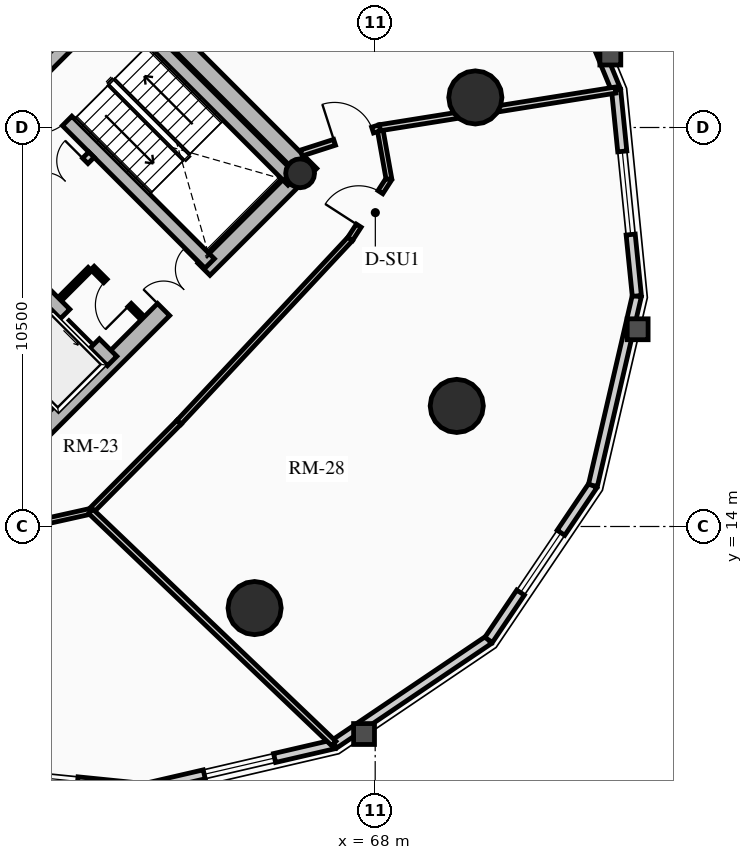
"""IFC4 building model, lengths in metres.
Left out: names, types, materials, properties, quantities, classifications, styles, units other than length and angle.
Written with IfcOpenShell. Run it as: python <this file> out.ifc"""

import sys

from ifc_helpers import new_model, si_unit, direction, frame, frame_2d, origin, origin_2d, place, context, subcontext, project, spatial, rectangle, circle, hollow_circle, extrude, source, transform, mapped, element, fill, save


model = new_model("IFC4")
c1 = context("Model", 3, precision=1e-05, world=origin(), true_north=direction((0.0, 1.0)))
c2 = subcontext(c1, "Body", "Model", "MODEL_VIEW")
j1 = project(units=[si_unit("LENGTHUNIT", "METRE"), si_unit("PLANEANGLEUNIT", "RADIAN")], contexts=[c1])
p1 = place(None, origin())
s1 = spatial("IfcSite", under=j1, at=p1, CompositionType="ELEMENT")
p2 = place(p1, origin())
s2 = spatial("IfcBuilding", under=s1, at=p2, CompositionType="ELEMENT")
p3 = place(p2, frame((0.0, 0.0, 136.6)))
s3 = spatial("IfcBuildingStorey", under=s2, at=p3, CompositionType="ELEMENT", Elevation=136.6)
p4 = place(p3, frame((66.303, 23.263, 0.0), z_axis=(0.0, 0.0, 1.0), x_axis=(-0.707106781187, 0.707106781187, 0.0)))
e1 = element("IfcWall", 1, at=p4, inside=s3, PredefinedType="SHEAR", context=c2, shape_type="SweptSolid", body=[
    extrude(rectangle(XDim=14.2, YDim=0.45, at=frame_2d((7.1, 0.0))), origin(), (0.0, 0.0, 1.0), 3.72),
])
p5 = place(p3, frame((58.578, 15.856, 0.0), z_axis=(0.0, 0.0, 1.0), x_axis=(0.707106781187, 0.707106781187, 0.0)))
e2 = element("IfcWall", 2, at=p5, inside=s3, PredefinedType="SHEAR", context=c2, shape_type="SweptSolid", body=[
    extrude(rectangle(XDim=10.7, YDim=0.45, at=frame_2d((5.35, 0.0))), origin(), (0.0, 0.0, 1.0), 3.72),
])
m1 = source(origin(), c2, "Body", "SweptSolid", [
    extrude(rectangle(XDim=1.5, YDim=2.02, at=frame_2d((0.75, 1.01))), frame((0.0, 0.235, 0.0), z_axis=(0.0, -1.0, 0.0), x_axis=(1.0, 0.0, 0.0)), (0.0, 0.0, 1.0), 0.47),
])
p6 = place(p5, frame((5.45, 0.0, 0.0)))
e3 = element("IfcOpeningElement", 3, at=p6, cuts=e2, PredefinedType="OPENING", context=c2, shape_type="MappedRepresentation", body=[
    mapped(m1, transform((0.0, 0.0, 0.0), x_axis=(1.0, 0.0, 0.0), y_axis=(0.0, 1.0, 0.0), z_axis=(0.0, 0.0, 1.0), scale=1.0)),
])
p7 = place(p3, frame((61.078, 18.355, 0.0), z_axis=(0.0, 0.0, 1.0), x_axis=(-0.707106781187, 0.707106781187, 0.0)))
e4 = element("IfcWall", 4, at=p7, inside=s3, PredefinedType="SHEAR", context=c2, shape_type="SweptSolid", body=[
    extrude(rectangle(XDim=13.75, YDim=0.35, at=frame_2d((6.875, 0.0))), origin(), (0.0, 0.0, 1.0), 3.72),
])
m2 = source(origin(), c2, "Body", "SweptSolid", [
    extrude(rectangle(XDim=1.1, YDim=2.015, at=frame_2d((0.55, 1.007))), frame((0.0, 0.185, 0.0), z_axis=(0.0, -1.0, 0.0), x_axis=(1.0, 0.0, 0.0)), (0.0, 0.0, 1.0), 0.37),
])
p8 = place(p7, frame((4.875, 0.0, 0.0)))
e5 = element("IfcOpeningElement", 5, at=p8, cuts=e4, PredefinedType="OPENING", context=c2, shape_type="MappedRepresentation", body=[
    mapped(m2, transform((0.0, 0.0, 0.0), x_axis=(1.0, 0.0, 0.0), y_axis=(0.0, 1.0, 0.0), z_axis=(0.0, 0.0, 1.0), scale=1.0)),
])
p9 = place(p7, frame((0.65, 0.0, 0.0)))
e6 = element("IfcOpeningElement", 6, at=p9, cuts=e4, PredefinedType="OPENING", context=c2, shape_type="MappedRepresentation", body=[
    mapped(m2, transform((0.0, 0.0, 0.0), x_axis=(1.0, 0.0, 0.0), y_axis=(0.0, 1.0, 0.0), z_axis=(0.0, 0.0, 1.0), scale=1.0)),
])
p10 = place(p7, frame((2.65, 0.0, 0.0)))
e7 = element("IfcOpeningElement", 7, at=p10, cuts=e4, PredefinedType="OPENING", context=c2, shape_type="MappedRepresentation", body=[
    mapped(m2, transform((0.0, 0.0, 0.0), x_axis=(1.0, 0.0, 0.0), y_axis=(0.0, 1.0, 0.0), z_axis=(0.0, 0.0, 1.0), scale=1.0)),
])
m3 = source(origin(), c2, "Body", "SweptSolid", [
    extrude(rectangle(XDim=1.15, YDim=2.02, at=frame_2d((0.575, 1.01))), frame((0.0, 0.185, 0.0), z_axis=(0.0, -1.0, 0.0), x_axis=(1.0, 0.0, 0.0)), (0.0, 0.0, 1.0), 0.37),
])
p11 = place(p7, frame((7.295, 0.0, 0.0)))
e8 = element("IfcOpeningElement", 8, at=p11, cuts=e4, PredefinedType="OPENING", context=c2, shape_type="MappedRepresentation", body=[
    mapped(m3, transform((0.0, 0.0, 0.0), x_axis=(1.0, 0.0, 0.0), y_axis=(0.0, 1.0, 0.0), z_axis=(0.0, 0.0, 1.0), scale=1.0)),
])
p12 = place(p3, frame((63.645, 20.922, 0.0), z_axis=(0.0, 0.0, 1.0), x_axis=(-0.70711946392, 0.707094098226, 0.0)))
e9 = element("IfcWall", 9, at=p12, inside=s3, PredefinedType="SHEAR", context=c2, shape_type="SweptSolid", body=[
    extrude(rectangle(XDim=9.625, YDim=0.35, at=frame_2d((4.812, 0.0))), origin(), (0.0, 0.0, 1.0), 3.72),
])
p13 = place(p12, frame((5.305, 0.0, 0.0)))
e10 = element("IfcOpeningElement", 10, at=p13, cuts=e9, PredefinedType="OPENING", context=c2, shape_type="MappedRepresentation", body=[
    mapped(m3, transform((0.0, 0.0, 0.0), x_axis=(1.0, 0.0, 0.0), y_axis=(0.0, 1.0, 0.0), z_axis=(0.0, 0.0, 1.0), scale=1.0)),
])
p14 = place(p3, frame((65.83, 23.107, 0.0), z_axis=(0.0, 0.0, 1.0), x_axis=(-0.707088616009, 0.707124945897, 0.0)))
e11 = element("IfcWall", 11, at=p14, inside=s3, PredefinedType="SHEAR", context=c2, shape_type="SweptSolid", body=[
    extrude(rectangle(XDim=6.72, YDim=0.35, at=frame_2d((3.36, 0.0))), origin(), (0.0, 0.0, 1.0), 3.72),
])
p15 = place(p3, frame((58.893, 25.674, 0.0), z_axis=(0.0, 0.0, 1.0), x_axis=(0.707106781187, 0.707106781187, 0.0)))
e12 = element("IfcWall", 12, at=p15, inside=s3, PredefinedType="SHEAR", context=c2, shape_type="SweptSolid", body=[
    extrude(rectangle(XDim=3.285, YDim=0.35, at=frame_2d((1.643, 0.0))), origin(), (0.0, 0.0, 1.0), 3.72),
])
p16 = place(p3, frame((66.024, 23.294, 0.0), z_axis=(0.0, 0.0, 1.0), x_axis=(0.707106781187, 0.707106781187, 0.0)))
e13 = element("IfcColumn", 13, at=p16, inside=s3, PredefinedType="COLUMN", context=c2, shape_type="SweptSolid", body=[
    extrude(hollow_circle(Radius=0.38, WallThickness=0.032, at=origin_2d()), origin(), (0.0, 0.0, 1.0), 3.72),
])
for number, where, z_axis, x_axis in (
    (14, (64.827, 11.854, 0.0), (0.0, 0.0, 1.0), (1.0, 0.0, 0.0)),
    (15, (70.146, 17.173, 0.0), (0.0, 0.0, 1.0), (1.0, 0.0, 0.0)),
    (16, (70.635, 25.291, 0.0), (0.0, 0.0, 1.0), (1.0, 0.0, 0.0)),
):
    element("IfcColumn", number, at=place(p3, frame(where, z_axis=z_axis, x_axis=x_axis)), inside=s3, PredefinedType="USERDEFINED", context=c2, shape_type="SweptSolid", body=[
        extrude(circle(Radius=0.7, at=origin_2d()), origin(), (0.0, 0.0, 1.0), 3.72),
    ])
p17 = place(p3, frame((61.933, 7.115, 0.0), z_axis=(0.0, 0.0, 1.0), x_axis=(-0.994971754311, 0.10015591906, 0.0)))
e17 = element("IfcWall", 17, at=p17, inside=s3, PredefinedType="SOLIDWALL", context=c2, shape_type="SweptSolid", body=[
    extrude(rectangle(XDim=5.448, YDim=0.24, at=frame_2d((2.724, 0.0))), origin(), (0.0, 0.0, 1.0), 2.949),
])
m4 = source(origin(), c2, "Body", "SweptSolid", [
    extrude(rectangle(XDim=1.9, YDim=1.35, at=frame_2d((0.95, 0.675))), frame((0.0, 0.13, 0.0), z_axis=(0.0, -1.0, 0.0), x_axis=(1.0, 0.0, 0.0)), (0.0, 0.0, 1.0), 0.26),
])
p18 = place(p17, frame((1.774, 0.0, 0.65)))
e18 = element("IfcOpeningElement", 18, at=p18, cuts=e17, PredefinedType="OPENING", context=c2, shape_type="MappedRepresentation", body=[
    mapped(m4, transform((0.0, 0.0, 0.0), x_axis=(1.0, 0.0, 0.0), y_axis=(0.0, 1.0, 0.0), z_axis=(0.0, 0.0, 1.0), scale=1.0)),
])
p19 = place(p3, frame((66.92, 8.271, 0.0), z_axis=(0.0, 0.0, 1.0), x_axis=(-0.974165631126, -0.225834725257, 0.0)))
e19 = element("IfcWall", 19, at=p19, inside=s3, PredefinedType="SOLIDWALL", context=c2, shape_type="SweptSolid", body=[
    extrude(rectangle(XDim=5.119, YDim=0.24, at=frame_2d((2.56, 0.0))), origin(), (0.0, 0.0, 1.0), 2.949),
])
p20 = place(p19, frame((1.609, 0.0, 0.65)))
e20 = element("IfcOpeningElement", 20, at=p20, cuts=e19, PredefinedType="OPENING", context=c2, shape_type="MappedRepresentation", body=[
    mapped(m4, transform((0.0, 0.0, 0.0), x_axis=(1.0, 0.0, 0.0), y_axis=(0.0, 1.0, 0.0), z_axis=(0.0, 0.0, 1.0), scale=1.0)),
])
p21 = place(p3, frame((70.985, 11.015, 0.0), z_axis=(0.0, 0.0, 1.0), x_axis=(-0.828781148131, -0.559572880421, 0.0)))
e21 = element("IfcWall", 21, at=p21, inside=s3, PredefinedType="SOLIDWALL", context=c2, shape_type="SweptSolid", body=[
    extrude(rectangle(XDim=4.905, YDim=0.24, at=frame_2d((2.452, 0.0))), origin(), (0.0, 0.0, 1.0), 2.949),
])
p22 = place(p3, frame((73.729, 15.08, 0.0), z_axis=(0.0, 0.0, 1.0), x_axis=(-0.559572880421, -0.828781148131, 0.0)))
e22 = element("IfcWall", 22, at=p22, inside=s3, PredefinedType="SOLIDWALL", context=c2, shape_type="SweptSolid", body=[
    extrude(rectangle(XDim=4.905, YDim=0.24, at=frame_2d((2.452, 0.0))), origin(), (0.0, 0.0, 1.0), 2.949),
])
p23 = place(p22, frame((1.502, 0.0, 0.65)))
e23 = element("IfcOpeningElement", 23, at=p23, cuts=e22, PredefinedType="OPENING", context=c2, shape_type="MappedRepresentation", body=[
    mapped(m4, transform((0.0, 0.0, 0.0), x_axis=(1.0, 0.0, 0.0), y_axis=(0.0, 1.0, 0.0), z_axis=(0.0, 0.0, 1.0), scale=1.0)),
])
p24 = place(p3, frame((74.885, 20.067, 0.0), z_axis=(0.0, 0.0, 1.0), x_axis=(-0.225834725257, -0.974165631126, 0.0)))
e24 = element("IfcWall", 24, at=p24, inside=s3, PredefinedType="SOLIDWALL", context=c2, shape_type="SweptSolid", body=[
    extrude(rectangle(XDim=5.119, YDim=0.24, at=frame_2d((2.56, 0.0))), origin(), (0.0, 0.0, 1.0), 2.949),
])
p25 = place(p3, frame((74.339, 25.487, 0.0), z_axis=(0.0, 0.0, 1.0), x_axis=(0.10015591906, -0.994971754311, 0.0)))
e25 = element("IfcWall", 25, at=p25, inside=s3, PredefinedType="SOLIDWALL", context=c2, shape_type="SweptSolid", body=[
    extrude(rectangle(XDim=5.448, YDim=0.24, at=frame_2d((2.724, 0.0))), origin(), (0.0, 0.0, 1.0), 2.949),
])
m5 = source(origin(), c2, "Body", "SweptSolid", [
    extrude(rectangle(XDim=2.2, YDim=1.35, at=frame_2d((1.1, 0.675))), frame((0.0, 0.13, 0.0), z_axis=(0.0, -1.0, 0.0), x_axis=(1.0, 0.0, 0.0)), (0.0, 0.0, 1.0), 0.26),
])
p26 = place(p25, frame((1.624, 0.0, 0.65)))
e26 = element("IfcOpeningElement", 26, at=p26, cuts=e25, PredefinedType="OPENING", context=c2, shape_type="MappedRepresentation", body=[
    mapped(m5, transform((0.0, 0.0, 0.0), x_axis=(1.0, 0.0, 0.0), y_axis=(0.0, 1.0, 0.0), z_axis=(0.0, 0.0, 1.0), scale=1.0)),
])
p27 = place(p3, frame((72.145, 30.811, 0.0), z_axis=(0.0, 0.0, 1.0), x_axis=(0.381027003055, -0.924563909604, 0.0)))
e27 = element("IfcWall", 27, at=p27, inside=s3, PredefinedType="SOLIDWALL", context=c2, shape_type="SweptSolid", body=[
    extrude(rectangle(XDim=5.758, YDim=0.24, at=frame_2d((2.879, 0.0))), origin(), (0.0, 0.0, 1.0), 2.949),
])
p28 = place(p3, frame((58.214, 21.467, 0.0), z_axis=(0.0, 0.0, 1.0), x_axis=(0.707106781187, 0.707106781187, 0.0)))
e28 = element("IfcWall", 28, at=p28, inside=s3, PredefinedType="PARTITIONING", context=c2, shape_type="SweptSolid", body=[
    extrude(rectangle(XDim=3.28, YDim=0.2, at=frame_2d((1.64, 0.0))), origin(), (0.0, 0.0, 1.0), 3.425),
])
m6 = source(origin(), c2, "Body", "SweptSolid", [
    extrude(rectangle(XDim=1.5, YDim=2.02, at=frame_2d((0.75, 1.01))), frame((0.0, 0.11, 0.0), z_axis=(0.0, -1.0, 0.0), x_axis=(1.0, 0.0, 0.0)), (0.0, 0.0, 1.0), 0.22),
])
p29 = place(p28, frame((1.55, 0.0, 0.0)))
e29 = element("IfcOpeningElement", 29, at=p29, cuts=e28, PredefinedType="OPENING", context=c2, shape_type="MappedRepresentation", body=[
    mapped(m6, transform((0.0, 0.0, 0.0), x_axis=(1.0, 0.0, 0.0), y_axis=(0.0, 1.0, 0.0), z_axis=(0.0, 0.0, 1.0), scale=1.0)),
])
p30 = place(p3, frame((61.835, 19.529, 0.0), z_axis=(0.0, 0.0, 1.0), x_axis=(-0.707174592913, 0.707038962956, 0.0)))
e30 = element("IfcWall", 30, at=p30, inside=s3, PredefinedType="PARTITIONING", context=c2, shape_type="SweptSolid", body=[
    extrude(rectangle(XDim=1.8, YDim=0.125, at=frame_2d((0.9, 0.0))), origin(), (0.0, 0.0, 1.0), 3.425),
])
m7 = source(origin(), c2, "Body", "SweptSolid", [
    extrude(rectangle(XDim=0.9, YDim=2.005, at=frame_2d((0.45, 1.002))), frame((0.0, 0.073, 0.0), z_axis=(0.0, -1.0, 0.0), x_axis=(1.0, 0.0, 0.0)), (0.0, 0.0, 1.0), 0.145),
])
p31 = place(p30, frame((0.42, 0.0, 0.0)))
e31 = element("IfcOpeningElement", 31, at=p31, cuts=e30, PredefinedType="OPENING", context=c2, shape_type="MappedRepresentation", body=[
    mapped(m7, transform((0.0, 0.0, 0.0), x_axis=(1.0, 0.0, 0.0), y_axis=(0.0, 1.0, 0.0), z_axis=(0.0, 0.0, 1.0), scale=1.0)),
])
p32 = place(p3, frame((59.713, 19.996, 0.0), z_axis=(0.0, 0.0, 1.0), x_axis=(0.707217726, 0.706995818963, 0.0)))
e32 = element("IfcWall", 32, at=p32, inside=s3, PredefinedType="PARTITIONING", context=c2, shape_type="SweptSolid", body=[
    extrude(rectangle(XDim=1.1, YDim=0.125, at=frame_2d((0.55, 0.0))), origin(), (0.0, 0.0, 1.0), 3.425),
])
p33 = place(p3, frame((58.971, 14.057, 0.0), z_axis=(0.0, 0.0, 1.0), x_axis=(0.976085233804, 0.217388169756, 0.0)))
e33 = element("IfcWall", 33, at=p33, inside=s3, PredefinedType="PARTITIONING", context=c2, shape_type="SweptSolid", body=[
    extrude(rectangle(XDim=1.581, YDim=0.15, at=frame_2d((0.791, 0.0))), origin(), (0.0, 0.0, 1.0), 2.995),
])
p34 = place(p3, frame((60.515, 14.401, 0.0), z_axis=(0.0, 0.0, 1.0), x_axis=(0.704179607439, 0.710021887316, 0.0)))
e34 = element("IfcWall", 34, at=p34, inside=s3, PredefinedType="PARTITIONING", context=c2, shape_type="SweptSolid", body=[
    extrude(rectangle(XDim=3.301, YDim=0.15, at=frame_2d((1.651, 0.0))), origin(), (0.0, 0.0, 1.0), 2.995),
])
p35 = place(p3, frame((62.839, 16.745, 0.0), z_axis=(0.0, 0.0, 1.0), x_axis=(0.682386779427, 0.73099130177, 0.0)))
e35 = element("IfcWall", 35, at=p35, inside=s3, PredefinedType="PARTITIONING", context=c2, shape_type="SweptSolid", body=[
    extrude(rectangle(XDim=6.6, YDim=0.15, at=frame_2d((3.3, 0.0))), origin(), (0.0, 0.0, 1.0), 2.995),
])
p36 = place(p3, frame((67.343, 21.569, 0.0), z_axis=(0.0, 0.0, 1.0), x_axis=(0.542722446786, 0.83991210597, 0.0)))
e36 = element("IfcWall", 36, at=p36, inside=s3, PredefinedType="PARTITIONING", context=c2, shape_type="SweptSolid", body=[
    extrude(rectangle(XDim=1.876, YDim=0.15, at=frame_2d((0.938, 0.0))), origin(), (0.0, 0.0, 1.0), 2.995),
])
m8 = source(origin(), c2, "Body", "SweptSolid", [
    extrude(rectangle(XDim=1.05, YDim=2.015, at=frame_2d((0.525, 1.007))), frame((0.0, 0.085, 0.0), z_axis=(0.0, -1.0, 0.0), x_axis=(1.0, 0.0, 0.0)), (0.0, 0.0, 1.0), 0.17),
])
p37 = place(p36, frame((0.413, 0.0, 0.0)))
e37 = element("IfcOpeningElement", 37, at=p37, cuts=e36, PredefinedType="OPENING", context=c2, shape_type="MappedRepresentation", body=[
    mapped(m8, transform((0.0, 0.0, 0.0), x_axis=(1.0, 0.0, 0.0), y_axis=(0.0, 1.0, 0.0), z_axis=(0.0, 0.0, 1.0), scale=1.0)),
])
p38 = place(p3, frame((68.362, 23.145, 0.0), z_axis=(0.0, 0.0, 1.0), x_axis=(-0.175605524171, 0.984460613677, 0.0)))
e38 = element("IfcWall", 38, at=p38, inside=s3, PredefinedType="PARTITIONING", context=c2, shape_type="SweptSolid", body=[
    extrude(rectangle(XDim=1.369, YDim=0.15, at=frame_2d((0.685, 0.0))), origin(), (0.0, 0.0, 1.0), 2.995),
])
p39 = place(p3, frame((60.515, 14.401, 0.0), z_axis=(0.0, 0.0, 1.0), x_axis=(0.722998961483, -0.690849116446, 0.0)))
e39 = element("IfcWall", 39, at=p39, inside=s3, PredefinedType="PARTITIONING", context=c2, shape_type="SweptSolid", body=[
    extrude(rectangle(XDim=8.847, YDim=0.16, at=frame_2d((4.423, 0.0))), origin(), (0.0, 0.0, 1.0), 2.949),
])
p40 = place(p3, frame((68.121, 24.493, 0.0), z_axis=(0.0, 0.0, 1.0), x_axis=(0.987466345552, 0.15782970697, 0.0)))
e40 = element("IfcWall", 40, at=p40, inside=s3, PredefinedType="PARTITIONING", context=c2, shape_type="SweptSolid", body=[
    extrude(rectangle(XDim=6.277, YDim=0.16, at=frame_2d((3.139, 0.0))), origin(), (0.0, 0.0, 1.0), 2.949),
])
p41 = place(p3, frame((66.056, 23.828, 0.0), z_axis=(0.0, 0.0, 1.0), x_axis=(0.951830504244, 0.306624674792, 0.0)))
e41 = element("IfcWall", 41, at=p41, inside=s3, PredefinedType="PARTITIONING", context=c2, shape_type="SweptSolid", body=[
    extrude(rectangle(XDim=2.17, YDim=0.16, at=frame_2d((1.085, 0.0))), origin(), (0.0, 0.0, 1.0), 2.995),
])
m9 = source(origin(), c2, "Body", "SweptSolid", [
    extrude(rectangle(XDim=1.05, YDim=2.015, at=frame_2d((0.525, 1.007))), frame((0.0, 0.09, 0.0), z_axis=(0.0, -1.0, 0.0), x_axis=(1.0, 0.0, 0.0)), (0.0, 0.0, 1.0), 0.18),
])
p42 = place(p41, frame((0.92, 0.0, 0.0)))
e42 = element("IfcOpeningElement", 42, at=p42, cuts=e41, PredefinedType="OPENING", context=c2, shape_type="MappedRepresentation", body=[
    mapped(m9, transform((0.0, 0.0, 0.0), x_axis=(1.0, 0.0, 0.0), y_axis=(0.0, 1.0, 0.0), z_axis=(0.0, 0.0, 1.0), scale=1.0)),
])
m10 = source(origin(), c2, "Body", "SweptSolid", [
    extrude(rectangle(XDim=1.9, YDim=1.35, at=frame_2d((0.95, 0.675))), frame((0.0, 0.03, 0.0), z_axis=(0.0, -1.0, 0.0), x_axis=(1.0, 0.0, 0.0)), (0.0, 0.0, 1.0), 0.06),
])
p43 = place(p18, origin())
e43 = element("IfcWindow", 43, at=p43, inside=s3, PartitioningType="DOUBLE_PANEL_VERTICAL", PredefinedType="WINDOW", context=c2, shape_type="MappedRepresentation", body=[
    mapped(m10, transform((0.0, 0.0, 0.0), x_axis=(1.0, 0.0, 0.0), y_axis=(0.0, 1.0, 0.0), z_axis=(0.0, 0.0, 1.0), scale=1.0)),
])
fill(e18, e43)
p44 = place(p20, origin())
e44 = element("IfcWindow", 44, at=p44, inside=s3, PartitioningType="DOUBLE_PANEL_VERTICAL", PredefinedType="WINDOW", context=c2, shape_type="MappedRepresentation", body=[
    mapped(m10, transform((0.0, 0.0, 0.0), x_axis=(1.0, 0.0, 0.0), y_axis=(0.0, 1.0, 0.0), z_axis=(0.0, 0.0, 1.0), scale=1.0)),
])
fill(e20, e44)
p45 = place(p23, origin())
e45 = element("IfcWindow", 45, at=p45, inside=s3, PartitioningType="DOUBLE_PANEL_VERTICAL", PredefinedType="WINDOW", context=c2, shape_type="MappedRepresentation", body=[
    mapped(m10, transform((0.0, 0.0, 0.0), x_axis=(1.0, 0.0, 0.0), y_axis=(0.0, 1.0, 0.0), z_axis=(0.0, 0.0, 1.0), scale=1.0)),
])
fill(e23, e45)
m11 = source(origin(), c2, "Body", "SweptSolid", [
    extrude(rectangle(XDim=2.2, YDim=1.35, at=frame_2d((1.1, 0.675))), frame((0.0, 0.03, 0.0), z_axis=(0.0, -1.0, 0.0), x_axis=(1.0, 0.0, 0.0)), (0.0, 0.0, 1.0), 0.06),
])
p46 = place(p26, origin())
e46 = element("IfcWindow", 46, at=p46, inside=s3, PartitioningType="DOUBLE_PANEL_VERTICAL", PredefinedType="WINDOW", context=c2, shape_type="MappedRepresentation", body=[
    mapped(m11, transform((0.0, 0.0, 0.0), x_axis=(1.0, 0.0, 0.0), y_axis=(0.0, 1.0, 0.0), z_axis=(0.0, 0.0, 1.0), scale=1.0)),
])
fill(e26, e46)
m12 = source(origin(), c2, "Body", "SweptSolid", [
    extrude(rectangle(XDim=1.1, YDim=2.015, at=frame_2d((0.55, 1.007))), frame((0.0, 0.025, 0.0), z_axis=(0.0, -1.0, 0.0), x_axis=(1.0, 0.0, 0.0)), (0.0, 0.0, 1.0), 0.05),
])
p47 = place(p9, origin())
e47 = element("IfcDoor", 47, at=p47, inside=s3, OperationType="SLIDING_TO_LEFT", PredefinedType="DOOR", context=c2, shape_type="MappedRepresentation", body=[
    mapped(m12, transform((0.0, 0.0, 0.0), x_axis=(1.0, 0.0, 0.0), y_axis=(0.0, 1.0, 0.0), z_axis=(0.0, 0.0, 1.0), scale=1.0)),
])
fill(e6, e47)
m13 = source(origin(), c2, "Body", "SweptSolid", [
    extrude(rectangle(XDim=1.15, YDim=2.02, at=frame_2d((0.575, 1.01))), frame((0.0, 0.025, 0.0), z_axis=(0.0, -1.0, 0.0), x_axis=(1.0, 0.0, 0.0)), (0.0, 0.0, 1.0), 0.05),
])
p48 = place(p13, origin())
e48 = element("IfcDoor", 48, at=p48, inside=s3, OperationType="SINGLE_SWING_RIGHT", PredefinedType="DOOR", context=c2, shape_type="MappedRepresentation", body=[
    mapped(m13, transform((0.0, 0.0, 0.0), x_axis=(1.0, 0.0, 0.0), y_axis=(0.0, 1.0, 0.0), z_axis=(0.0, 0.0, 1.0), scale=1.0)),
])
fill(e10, e48)
m14 = source(origin(), c2, "Body", "SweptSolid", [
    extrude(rectangle(XDim=1.5, YDim=2.02, at=frame_2d((0.75, 1.01))), frame((0.0, 0.025, 0.0), z_axis=(0.0, -1.0, 0.0), x_axis=(1.0, 0.0, 0.0)), (0.0, 0.0, 1.0), 0.05),
])
p49 = place(p6, origin())
e49 = element("IfcDoor", 49, at=p49, inside=s3, OperationType="DOUBLE_DOOR_SINGLE_SWING", PredefinedType="DOOR", context=c2, shape_type="MappedRepresentation", body=[
    mapped(m14, transform((0.0, 0.0, 0.0), x_axis=(1.0, 0.0, 0.0), y_axis=(0.0, 1.0, 0.0), z_axis=(0.0, 0.0, 1.0), scale=1.0)),
])
fill(e3, e49)
p50 = place(p29, origin())
e50 = element("IfcDoor", 50, at=p50, inside=s3, OperationType="DOUBLE_DOOR_SINGLE_SWING", PredefinedType="DOOR", context=c2, shape_type="MappedRepresentation", body=[
    mapped(m14, transform((0.0, 0.0, 0.0), x_axis=(1.0, 0.0, 0.0), y_axis=(0.0, 1.0, 0.0), z_axis=(0.0, 0.0, 1.0), scale=1.0)),
])
fill(e29, e50)
m15 = source(origin(), c2, "Body", "SweptSolid", [
    extrude(rectangle(XDim=0.9, YDim=2.005, at=frame_2d((0.45, 1.002))), frame((0.0, 0.025, 0.0), z_axis=(0.0, -1.0, 0.0), x_axis=(1.0, 0.0, 0.0)), (0.0, 0.0, 1.0), 0.05),
])
p51 = place(p31, origin())
e51 = element("IfcDoor", 51, at=p51, inside=s3, OperationType="SINGLE_SWING_LEFT", PredefinedType="DOOR", context=c2, shape_type="MappedRepresentation", body=[
    mapped(m15, transform((0.0, 0.0, 0.0), x_axis=(1.0, 0.0, 0.0), y_axis=(0.0, 1.0, 0.0), z_axis=(0.0, 0.0, 1.0), scale=1.0)),
])
fill(e31, e51)
m16 = source(origin(), c2, "Body", "SweptSolid", [
    extrude(rectangle(XDim=1.05, YDim=2.015, at=frame_2d((0.525, 1.007))), frame((0.0, 0.025, 0.0), z_axis=(0.0, -1.0, 0.0), x_axis=(1.0, 0.0, 0.0)), (0.0, 0.0, 1.0), 0.05),
])
p52 = place(p42, origin())
e52 = element("IfcDoor", 52, at=p52, inside=s3, OperationType="SINGLE_SWING_LEFT", PredefinedType="DOOR", context=c2, shape_type="MappedRepresentation", body=[
    mapped(m16, transform((0.0, 0.0, 0.0), x_axis=(1.0, 0.0, 0.0), y_axis=(0.0, 1.0, 0.0), z_axis=(0.0, 0.0, 1.0), scale=1.0)),
])
fill(e42, e52)
p53 = place(p37, origin())
e53 = element("IfcDoor", 53, at=p53, inside=s3, OperationType="SINGLE_SWING_LEFT", PredefinedType="DOOR", context=c2, shape_type="MappedRepresentation", body=[
    mapped(m16, transform((0.0, 0.0, 0.0), x_axis=(1.0, 0.0, 0.0), y_axis=(0.0, 1.0, 0.0), z_axis=(0.0, 0.0, 1.0), scale=1.0)),
])
fill(e37, e53)
save(model, sys.argv[1])
